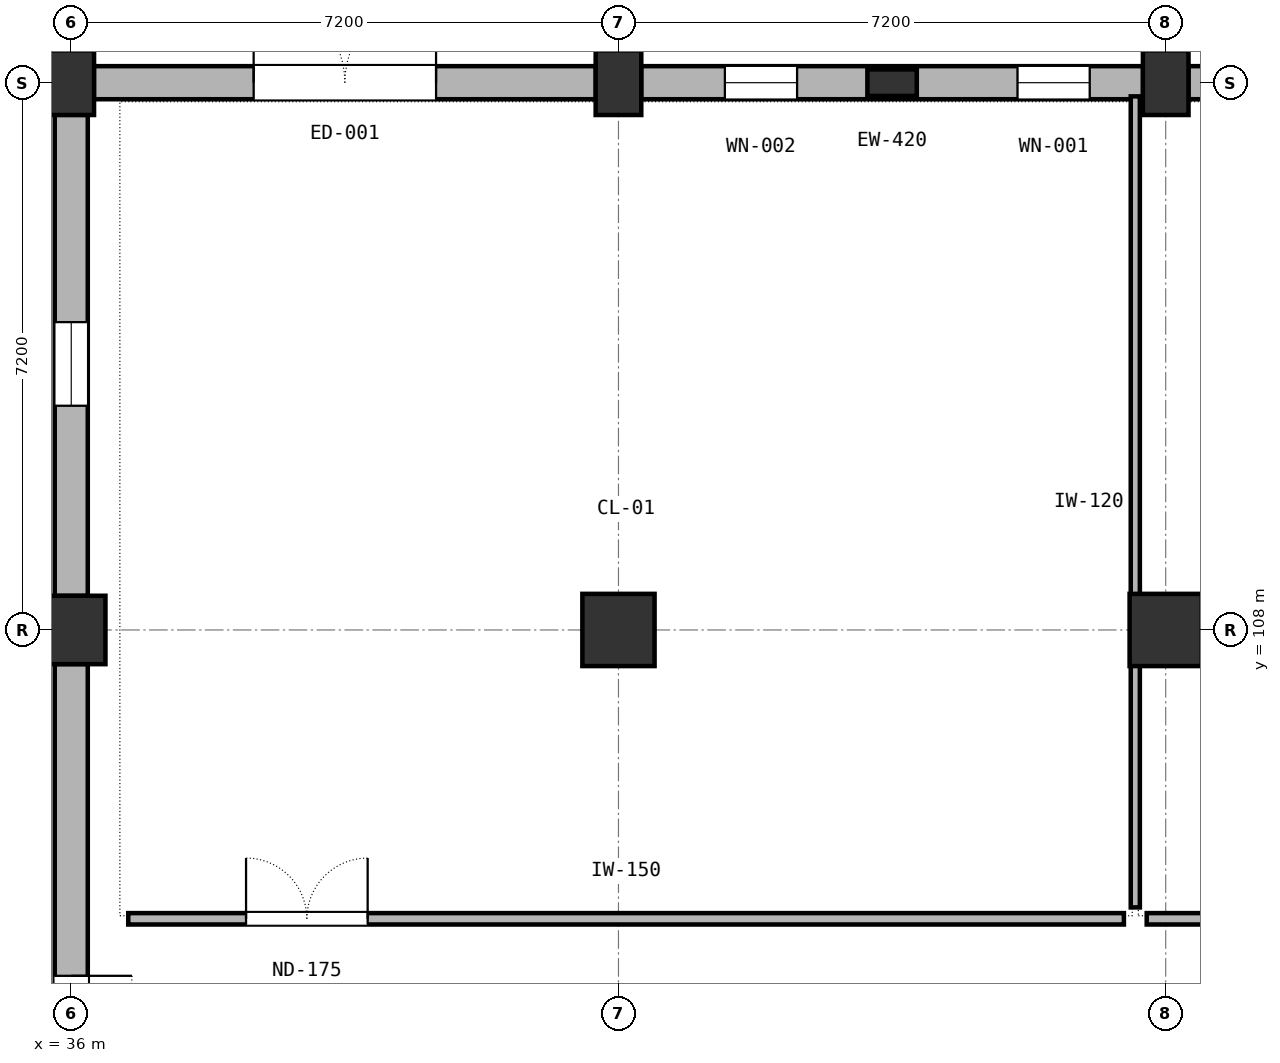
"""IFC4 building model, lengths in metres.
Left out: names, types, materials, properties, quantities, classifications, styles, units other than length and angle.
Written with IfcOpenShell. Run it as: python <this file> out.ifc"""

import sys

from ifc_helpers import new_model, si_unit, direction, frame, frame_2d, origin, origin_2d, place, context, subcontext, project, spatial, rectangle, extrude, element, fill, save


model = new_model("IFC4")
c1 = context("Model", 3, precision=1e-05, world=origin(), true_north=direction((0.0, 1.0)))
c2 = subcontext(c1, "Body", "Model", "MODEL_VIEW")
j1 = project(units=[si_unit("LENGTHUNIT", "METRE"), si_unit("PLANEANGLEUNIT", "RADIAN")], contexts=[c1])
p1 = place(None, origin())
s1 = spatial("IfcSite", under=j1, at=p1, CompositionType="ELEMENT")
p2 = place(p1, origin())
s2 = spatial("IfcBuilding", under=s1, at=p2, CompositionType="ELEMENT")
p3 = place(p2, origin())
s3 = spatial("IfcBuildingStorey", under=s2, at=p3, CompositionType="ELEMENT", Elevation=0.0)
p4 = place(p3, frame((36.0, 108.0, 0.0), z_axis=(0.0, 0.0, 1.0), x_axis=(1.0, 0.0, 0.0)))
e1 = element("IfcColumn", 1, at=p4, inside=s3, PredefinedType="COLUMN", context=c2, shape_type="SweptSolid", body=[
    extrude(rectangle(XDim=0.9, YDim=0.9, at=origin_2d()), origin(), (0.0, 0.0, 1.0), 5.4),
])
p5 = place(p3, frame((36.0, 115.2, 0.0), z_axis=(0.0, 0.0, 1.0), x_axis=(1.0, 0.0, 0.0)))
e2 = element("IfcColumn", 2, at=p5, inside=s3, PredefinedType="COLUMN", context=c2, shape_type="SweptSolid", body=[
    extrude(rectangle(XDim=0.6, YDim=0.85, at=origin_2d()), origin(), (0.0, 0.0, 1.0), 5.4),
])
p6 = place(p3, frame((43.2, 108.0, 0.0), z_axis=(0.0, 0.0, 1.0), x_axis=(1.0, 0.0, 0.0)))
e3 = element("IfcColumn", 3, at=p6, inside=s3, PredefinedType="COLUMN", context=c2, shape_type="SweptSolid", body=[
    extrude(rectangle(XDim=0.95, YDim=0.95, at=origin_2d()), origin(), (0.0, 0.0, 1.0), 5.4),
])
p7 = place(p3, frame((43.2, 115.2, 0.0), z_axis=(0.0, 0.0, 1.0), x_axis=(1.0, 0.0, 0.0)))
e4 = element("IfcColumn", 4, at=p7, inside=s3, PredefinedType="COLUMN", context=c2, shape_type="SweptSolid", body=[
    extrude(rectangle(XDim=0.6, YDim=0.85, at=origin_2d()), origin(), (0.0, 0.0, 1.0), 5.4),
])
p8 = place(p3, frame((50.4, 108.0, 0.0), z_axis=(0.0, 0.0, 1.0), x_axis=(1.0, 0.0, 0.0)))
e5 = element("IfcColumn", 5, at=p8, inside=s3, PredefinedType="COLUMN", context=c2, shape_type="SweptSolid", body=[
    extrude(rectangle(XDim=0.95, YDim=0.95, at=origin_2d()), origin(), (0.0, 0.0, 1.0), 5.4),
])
p9 = place(p3, frame((50.4, 115.2, 0.0), z_axis=(0.0, 0.0, 1.0), x_axis=(1.0, 0.0, 0.0)))
e6 = element("IfcColumn", 6, at=p9, inside=s3, PredefinedType="COLUMN", context=c2, shape_type="SweptSolid", body=[
    extrude(rectangle(XDim=0.6, YDim=0.85, at=origin_2d()), origin(), (0.0, 0.0, 1.0), 5.4),
])
p10 = place(p3, frame((46.8, 115.2, 0.0), z_axis=(0.0, 0.0, 1.0), x_axis=(1.0, 0.0, 0.0)))
e7 = element("IfcColumn", 7, at=p10, inside=s3, PredefinedType="PILASTER", context=c2, shape_type="SweptSolid", body=[
    extrude(rectangle(XDim=0.65, YDim=0.35, at=origin_2d()), origin(), (0.0, 0.0, 1.0), 5.4),
])
p11 = place(p3, frame((42.902, 115.2, 0.0), z_axis=(0.0, 0.0, 1.0), x_axis=(-1.0, 0.0, 0.0)))
e8 = element("IfcWall", 8, at=p11, inside=s3, PredefinedType="SOLIDWALL", context=c2, shape_type="SweptSolid", body=[
    extrude(rectangle(XDim=6.604, YDim=0.435, at=frame_2d((3.302, 0.0))), origin(), (0.0, 0.0, 1.0), 4.1),
])
p12 = place(p11, frame((2.102, 0.0, 0.0)))
e9 = element("IfcOpeningElement", 9, at=p12, cuts=e8, PredefinedType="OPENING", context=c2, shape_type="SweptSolid", body=[
    extrude(rectangle(XDim=2.4, YDim=2.8, at=frame_2d((1.2, 1.4))), frame((0.0, 0.228, 0.0), z_axis=(0.0, -1.0, 0.0), x_axis=(1.0, 0.0, 0.0)), (0.0, 0.0, 1.0), 0.455),
])
p13 = place(p3, frame((50.102, 115.2, 0.0), z_axis=(0.0, 0.0, 1.0), x_axis=(-1.0, 0.0, 0.0)))
e10 = element("IfcWall", 10, at=p13, inside=s3, PredefinedType="SOLIDWALL", context=c2, shape_type="SweptSolid", body=[
    extrude(rectangle(XDim=6.604, YDim=0.435, at=frame_2d((3.302, 0.0))), origin(), (0.0, 0.0, 1.0), 4.1),
])
p14 = place(p13, frame((0.702, 0.0, 0.7)))
e11 = element("IfcOpeningElement", 11, at=p14, cuts=e10, PredefinedType="OPENING", context=c2, shape_type="SweptSolid", body=[
    extrude(rectangle(XDim=0.95, YDim=2.6, at=frame_2d((0.475, 1.3))), frame((0.0, 0.228, 0.0), z_axis=(0.0, -1.0, 0.0), x_axis=(1.0, 0.0, 0.0)), (0.0, 0.0, 1.0), 0.455),
])
p15 = place(p13, frame((4.552, 0.0, 0.7)))
e12 = element("IfcOpeningElement", 12, at=p15, cuts=e10, PredefinedType="OPENING", context=c2, shape_type="SweptSolid", body=[
    extrude(rectangle(XDim=0.95, YDim=2.6, at=frame_2d((0.475, 1.3))), frame((0.0, 0.228, 0.0), z_axis=(0.0, -1.0, 0.0), x_axis=(1.0, 0.0, 0.0)), (0.0, 0.0, 1.0), 0.455),
])
p16 = place(p3, frame((57.302, 115.2, 0.0), z_axis=(0.0, 0.0, 1.0), x_axis=(-1.0, 0.0, 0.0)))
e13 = element("IfcWall", 13, at=p16, inside=s3, PredefinedType="SOLIDWALL", context=c2, shape_type="SweptSolid", body=[
    extrude(rectangle(XDim=6.604, YDim=0.435, at=frame_2d((3.302, 0.0))), origin(), (0.0, 0.0, 1.0), 4.1),
])
p17 = place(p16, frame((2.102, 0.0, 0.0)))
e14 = element("IfcOpeningElement", 14, at=p17, cuts=e13, PredefinedType="OPENING", context=c2, shape_type="SweptSolid", body=[
    extrude(rectangle(XDim=2.4, YDim=2.8, at=frame_2d((1.2, 1.4))), frame((0.0, 0.228, 0.0), z_axis=(0.0, -1.0, 0.0), x_axis=(1.0, 0.0, 0.0)), (0.0, 0.0, 1.0), 0.455),
])
p18 = place(p3, frame((36.0, 101.248, 0.0), z_axis=(0.0, 0.0, 1.0), x_axis=(0.0, 1.0, 0.0)))
e15 = element("IfcWall", 15, at=p18, inside=s3, PredefinedType="SOLIDWALL", context=c2, shape_type="SweptSolid", body=[
    extrude(rectangle(XDim=6.304, YDim=0.435, at=frame_2d((3.152, 0.0))), origin(), (0.0, 0.0, 1.0), 4.1),
])
p19 = place(p18, frame((0.602, 0.0, 0.0)))
e16 = element("IfcOpeningElement", 16, at=p19, cuts=e15, PredefinedType="OPENING", context=c2, shape_type="SweptSolid", body=[
    extrude(rectangle(XDim=1.6, YDim=2.2, at=frame_2d((0.8, 1.1))), frame((0.0, 0.228, 0.0), z_axis=(0.0, -1.0, 0.0), x_axis=(1.0, 0.0, 0.0)), (0.0, 0.0, 1.0), 0.455),
])
p20 = place(p3, frame((36.0, 108.448, 0.0), z_axis=(0.0, 0.0, 1.0), x_axis=(0.0, 1.0, 0.0)))
e17 = element("IfcWall", 17, at=p20, inside=s3, PredefinedType="SOLIDWALL", context=c2, shape_type="SweptSolid", body=[
    extrude(rectangle(XDim=6.329, YDim=0.435, at=frame_2d((3.165, 0.0))), origin(), (0.0, 0.0, 1.0), 4.1),
])
p21 = place(p20, frame((2.502, 0.0, 0.7)))
e18 = element("IfcOpeningElement", 18, at=p21, cuts=e17, PredefinedType="OPENING", context=c2, shape_type="SweptSolid", body=[
    extrude(rectangle(XDim=1.1, YDim=2.35, at=frame_2d((0.55, 1.175))), frame((0.0, 0.228, 0.0), z_axis=(0.0, -1.0, 0.0), x_axis=(1.0, 0.0, 0.0)), (0.0, 0.0, 1.0), 0.455),
])
p22 = place(p3, frame((36.75, 104.2, 0.0), z_axis=(0.0, 0.0, 1.0), x_axis=(1.0, 0.0, 0.0)))
e19 = element("IfcWall", 19, at=p22, inside=s3, PredefinedType="PARTITIONING", context=c2, shape_type="SweptSolid", body=[
    extrude(rectangle(XDim=13.1, YDim=0.15, at=frame_2d((6.55, 0.0))), origin(), (0.0, 0.0, 1.0), 4.12),
])
p23 = place(p22, frame((1.55, 0.0, 0.0)))
e20 = element("IfcOpeningElement", 20, at=p23, cuts=e19, PredefinedType="OPENING", context=c2, shape_type="SweptSolid", body=[
    extrude(rectangle(XDim=1.6, YDim=2.2, at=frame_2d((0.8, 1.1))), frame((0.0, 0.085, 0.0), z_axis=(0.0, -1.0, 0.0), x_axis=(1.0, 0.0, 0.0)), (0.0, 0.0, 1.0), 0.17),
])
p24 = place(p3, frame((50.15, 104.2, 0.0), z_axis=(0.0, 0.0, 1.0), x_axis=(1.0, 0.0, 0.0)))
e21 = element("IfcWall", 21, at=p24, inside=s3, PredefinedType="PARTITIONING", context=c2, shape_type="SweptSolid", body=[
    extrude(rectangle(XDim=13.5, YDim=0.15, at=frame_2d((6.75, 0.0))), origin(), (0.0, 0.0, 1.0), 4.12),
])
p25 = place(p24, frame((1.65, 0.0, 0.0)))
e22 = element("IfcOpeningElement", 22, at=p25, cuts=e21, PredefinedType="OPENING", context=c2, shape_type="SweptSolid", body=[
    extrude(rectangle(XDim=1.4, YDim=2.2, at=frame_2d((0.7, 1.1))), frame((0.0, 0.085, 0.0), z_axis=(0.0, -1.0, 0.0), x_axis=(1.0, 0.0, 0.0)), (0.0, 0.0, 1.0), 0.17),
])
p26 = place(p3, frame((50.0, 104.35, 0.0), z_axis=(0.0, 0.0, 1.0), x_axis=(0.0, 1.0, 0.0)))
e23 = element("IfcWall", 23, at=p26, inside=s3, PredefinedType="PARTITIONING", context=c2, shape_type="SweptSolid", body=[
    extrude(rectangle(XDim=10.67, YDim=0.12, at=frame_2d((5.335, 0.0))), origin(), (0.0, 0.0, 1.0), 4.12),
])
p27 = place(p12, frame((2.4, 0.0, 0.0), z_axis=(0.0, 0.0, 1.0), x_axis=(-1.0, 0.0, 0.0)))
e24 = element("IfcDoor", 24, at=p27, inside=s3, OperationType="DOUBLE_DOOR_SINGLE_SWING", PredefinedType="DOOR", context=c2, shape_type="SweptSolid", body=[
    extrude(rectangle(XDim=2.4, YDim=2.8, at=frame_2d((1.2, 1.4))), frame((0.0, 0.025, 0.0), z_axis=(0.0, -1.0, 0.0), x_axis=(1.0, 0.0, 0.0)), (0.0, 0.0, 1.0), 0.05),
])
fill(e9, e24)
p28 = place(p14, origin())
e25 = element("IfcWindow", 25, at=p28, inside=s3, PartitioningType="SINGLE_PANEL", PredefinedType="WINDOW", context=c2, shape_type="SweptSolid", body=[
    extrude(rectangle(XDim=0.95, YDim=2.6, at=frame_2d((0.475, 1.3))), frame((0.0, 0.03, 0.0), z_axis=(0.0, -1.0, 0.0), x_axis=(1.0, 0.0, 0.0)), (0.0, 0.0, 1.0), 0.06),
])
fill(e11, e25)
p29 = place(p15, origin())
e26 = element("IfcWindow", 26, at=p29, inside=s3, PartitioningType="SINGLE_PANEL", PredefinedType="WINDOW", context=c2, shape_type="SweptSolid", body=[
    extrude(rectangle(XDim=0.95, YDim=2.6, at=frame_2d((0.475, 1.3))), frame((0.0, 0.03, 0.0), z_axis=(0.0, -1.0, 0.0), x_axis=(1.0, 0.0, 0.0)), (0.0, 0.0, 1.0), 0.06),
])
fill(e12, e26)
p30 = place(p19, frame((1.6, 0.0, 0.0), z_axis=(0.0, 0.0, 1.0), x_axis=(-1.0, 0.0, 0.0)))
e27 = element("IfcDoor", 27, at=p30, inside=s3, OperationType="DOUBLE_DOOR_SINGLE_SWING", PredefinedType="DOOR", context=c2, shape_type="SweptSolid", body=[
    extrude(rectangle(XDim=1.6, YDim=2.2, at=frame_2d((0.8, 1.1))), frame((0.0, 0.025, 0.0), z_axis=(0.0, -1.0, 0.0), x_axis=(1.0, 0.0, 0.0)), (0.0, 0.0, 1.0), 0.05),
])
fill(e16, e27)
p31 = place(p21, origin())
e28 = element("IfcWindow", 28, at=p31, inside=s3, PartitioningType="SINGLE_PANEL", PredefinedType="WINDOW", context=c2, shape_type="SweptSolid", body=[
    extrude(rectangle(XDim=1.1, YDim=2.35, at=frame_2d((0.55, 1.175))), frame((0.0, 0.03, 0.0), z_axis=(0.0, -1.0, 0.0), x_axis=(1.0, 0.0, 0.0)), (0.0, 0.0, 1.0), 0.06),
])
fill(e18, e28)
p32 = place(p23, origin())
e29 = element("IfcDoor", 29, at=p32, inside=s3, OperationType="DOUBLE_DOOR_SINGLE_SWING", PredefinedType="DOOR", context=c2, shape_type="SweptSolid", body=[
    extrude(rectangle(XDim=1.6, YDim=2.2, at=frame_2d((0.8, 1.1))), frame((0.0, 0.025, 0.0), z_axis=(0.0, -1.0, 0.0), x_axis=(1.0, 0.0, 0.0)), (0.0, 0.0, 1.0), 0.05),
])
fill(e20, e29)
save(model, sys.argv[1])
